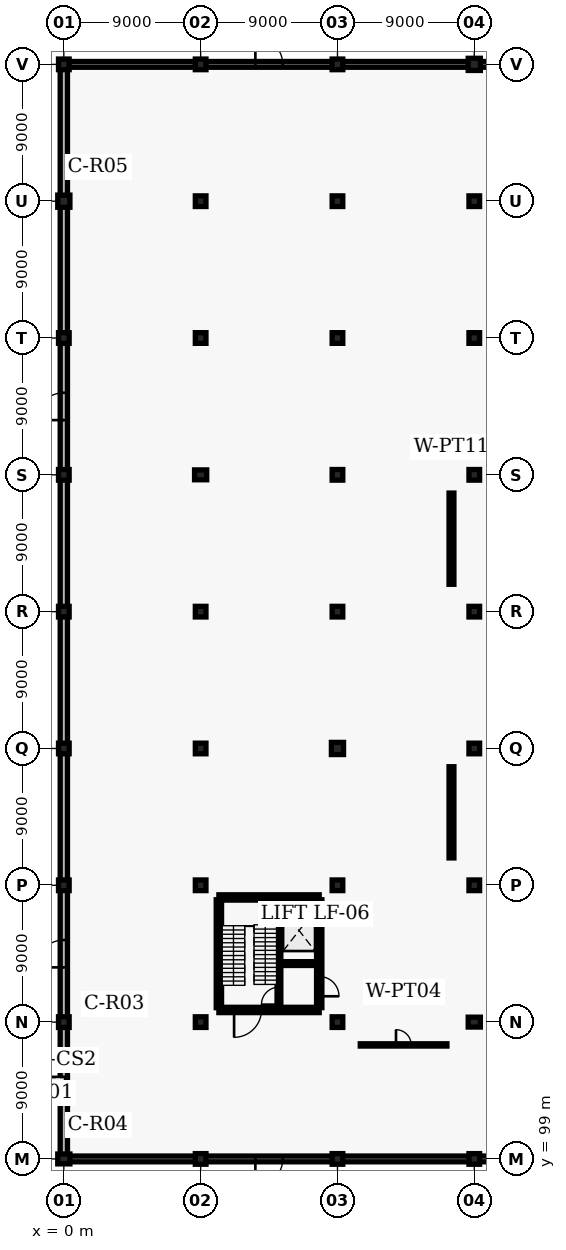
"""IFC4 building model, lengths in metres.
Left out: names, types, materials, properties, quantities, classifications, styles, units other than length and angle.
Written with IfcOpenShell. Run it as: python <this file> out.ifc"""

import sys

from ifc_helpers import new_model, si_unit, direction, frame, frame_2d, origin, origin_2d, place, context, subcontext, project, spatial, rectangle, circle, extrude, element, fill, save


model = new_model("IFC4")
c1 = context("Model", 3, precision=1e-05, world=origin(), true_north=direction((0.0, 1.0)))
c2 = subcontext(c1, "Body", "Model", "MODEL_VIEW")
j1 = project(units=[si_unit("LENGTHUNIT", "METRE"), si_unit("PLANEANGLEUNIT", "RADIAN")], contexts=[c1])
p1 = place(None, origin())
s1 = spatial("IfcSite", under=j1, at=p1, CompositionType="ELEMENT")
p2 = place(p1, origin())
s2 = spatial("IfcBuilding", under=s1, at=p2, CompositionType="ELEMENT")
p3 = place(p2, origin())
s3 = spatial("IfcBuildingStorey", under=s2, at=p3, CompositionType="ELEMENT", Elevation=0.0)
p4 = place(p3, frame((0.0, 99.0, 0.0), z_axis=(0.0, 0.0, 1.0), x_axis=(1.0, 0.0, 0.0)))
e1 = element("IfcColumn", 1, at=p4, inside=s3, PredefinedType="COLUMN", context=c2, shape_type="SweptSolid", body=[
    extrude(rectangle(XDim=0.8, YDim=0.65, at=origin_2d()), origin(), (0.0, 0.0, 1.0), 5.4),
])
for number, where, z_axis, x_axis in (
    (2, (0.0, 108.0, 0.0), (0.0, 0.0, 1.0), (1.0, 0.0, 0.0)),
    (3, (0.0, 117.0, 0.0), (0.0, 0.0, 1.0), (1.0, 0.0, 0.0)),
    (4, (0.0, 126.0, 0.0), (0.0, 0.0, 1.0), (1.0, 0.0, 0.0)),
    (5, (0.0, 135.0, 0.0), (0.0, 0.0, 1.0), (1.0, 0.0, 0.0)),
    (6, (0.0, 144.0, 0.0), (0.0, 0.0, 1.0), (1.0, 0.0, 0.0)),
    (7, (0.0, 153.0, 0.0), (0.0, 0.0, 1.0), (1.0, 0.0, 0.0)),
):
    element("IfcColumn", number, at=place(p3, frame(where, z_axis=z_axis, x_axis=x_axis)), inside=s3, PredefinedType="COLUMN", context=c2, shape_type="SweptSolid", body=[
        extrude(rectangle(XDim=0.7, YDim=0.7, at=origin_2d()), origin(), (0.0, 0.0, 1.0), 5.4),
    ])
p5 = place(p3, frame((0.0, 162.0, 0.0), z_axis=(0.0, 0.0, 1.0), x_axis=(1.0, 0.0, 0.0)))
e8 = element("IfcColumn", 8, at=p5, inside=s3, PredefinedType="COLUMN", context=c2, shape_type="SweptSolid", body=[
    extrude(circle(Radius=0.4, at=origin_2d()), origin(), (0.0, 0.0, 1.0), 5.4),
])
for number, where, z_axis, x_axis in (
    (9, (0.0, 171.0, 0.0), (0.0, 0.0, 1.0), (1.0, 0.0, 0.0)),
    (10, (9.0, 99.0, 0.0), (0.0, 0.0, 1.0), (1.0, 0.0, 0.0)),
    (11, (9.0, 108.0, 0.0), (0.0, 0.0, 1.0), (1.0, 0.0, 0.0)),
    (12, (9.0, 117.0, 0.0), (0.0, 0.0, 1.0), (1.0, 0.0, 0.0)),
    (13, (9.0, 126.0, 0.0), (0.0, 0.0, 1.0), (1.0, 0.0, 0.0)),
    (14, (9.0, 135.0, 0.0), (0.0, 0.0, 1.0), (1.0, 0.0, 0.0)),
):
    element("IfcColumn", number, at=place(p3, frame(where, z_axis=z_axis, x_axis=x_axis)), inside=s3, PredefinedType="COLUMN", context=c2, shape_type="SweptSolid", body=[
        extrude(rectangle(XDim=0.7, YDim=0.7, at=origin_2d()), origin(), (0.0, 0.0, 1.0), 5.4),
    ])
p6 = place(p3, frame((9.0, 144.0, 0.0), z_axis=(0.0, 0.0, 1.0), x_axis=(1.0, 0.0, 0.0)))
e15 = element("IfcColumn", 15, at=p6, inside=s3, PredefinedType="COLUMN", context=c2, shape_type="SweptSolid", body=[
    extrude(rectangle(XDim=0.8, YDim=0.65, at=origin_2d()), origin(), (0.0, 0.0, 1.0), 5.4),
])
for number, where, z_axis, x_axis in (
    (16, (9.0, 153.0, 0.0), (0.0, 0.0, 1.0), (1.0, 0.0, 0.0)),
    (17, (9.0, 162.0, 0.0), (0.0, 0.0, 1.0), (1.0, 0.0, 0.0)),
    (18, (9.0, 171.0, 0.0), (0.0, 0.0, 1.0), (1.0, 0.0, 0.0)),
    (19, (18.0, 99.0, 0.0), (0.0, 0.0, 1.0), (1.0, 0.0, 0.0)),
    (20, (18.0, 108.0, 0.0), (0.0, 0.0, 1.0), (1.0, 0.0, 0.0)),
    (21, (18.0, 117.0, 0.0), (0.0, 0.0, 1.0), (1.0, 0.0, 0.0)),
):
    element("IfcColumn", number, at=place(p3, frame(where, z_axis=z_axis, x_axis=x_axis)), inside=s3, PredefinedType="COLUMN", context=c2, shape_type="SweptSolid", body=[
        extrude(rectangle(XDim=0.7, YDim=0.7, at=origin_2d()), origin(), (0.0, 0.0, 1.0), 5.4),
    ])
p7 = place(p3, frame((18.0, 126.0, 0.0), z_axis=(0.0, 0.0, 1.0), x_axis=(1.0, 0.0, 0.0)))
e22 = element("IfcColumn", 22, at=p7, inside=s3, PredefinedType="COLUMN", context=c2, shape_type="SweptSolid", body=[
    extrude(circle(Radius=0.4, at=origin_2d()), origin(), (0.0, 0.0, 1.0), 5.4),
])
for number, where, z_axis, x_axis in (
    (23, (18.0, 135.0, 0.0), (0.0, 0.0, 1.0), (1.0, 0.0, 0.0)),
    (24, (18.0, 144.0, 0.0), (0.0, 0.0, 1.0), (1.0, 0.0, 0.0)),
    (25, (18.0, 153.0, 0.0), (0.0, 0.0, 1.0), (1.0, 0.0, 0.0)),
    (26, (18.0, 162.0, 0.0), (0.0, 0.0, 1.0), (1.0, 0.0, 0.0)),
    (27, (18.0, 171.0, 0.0), (0.0, 0.0, 1.0), (1.0, 0.0, 0.0)),
    (28, (27.0, 99.0, 0.0), (0.0, 0.0, 1.0), (1.0, 0.0, 0.0)),
):
    element("IfcColumn", number, at=place(p3, frame(where, z_axis=z_axis, x_axis=x_axis)), inside=s3, PredefinedType="COLUMN", context=c2, shape_type="SweptSolid", body=[
        extrude(rectangle(XDim=0.7, YDim=0.7, at=origin_2d()), origin(), (0.0, 0.0, 1.0), 5.4),
    ])
p8 = place(p3, frame((27.0, 108.0, 0.0), z_axis=(0.0, 0.0, 1.0), x_axis=(1.0, 0.0, 0.0)))
e29 = element("IfcColumn", 29, at=p8, inside=s3, PredefinedType="COLUMN", context=c2, shape_type="SweptSolid", body=[
    extrude(rectangle(XDim=0.8, YDim=0.65, at=origin_2d()), origin(), (0.0, 0.0, 1.0), 5.4),
])
for number, where, z_axis, x_axis in (
    (30, (27.0, 117.0, 0.0), (0.0, 0.0, 1.0), (1.0, 0.0, 0.0)),
    (31, (27.0, 126.0, 0.0), (0.0, 0.0, 1.0), (1.0, 0.0, 0.0)),
    (32, (27.0, 135.0, 0.0), (0.0, 0.0, 1.0), (1.0, 0.0, 0.0)),
    (33, (27.0, 144.0, 0.0), (0.0, 0.0, 1.0), (1.0, 0.0, 0.0)),
    (34, (27.0, 153.0, 0.0), (0.0, 0.0, 1.0), (1.0, 0.0, 0.0)),
    (35, (27.0, 162.0, 0.0), (0.0, 0.0, 1.0), (1.0, 0.0, 0.0)),
):
    element("IfcColumn", number, at=place(p3, frame(where, z_axis=z_axis, x_axis=x_axis)), inside=s3, PredefinedType="COLUMN", context=c2, shape_type="SweptSolid", body=[
        extrude(rectangle(XDim=0.7, YDim=0.7, at=origin_2d()), origin(), (0.0, 0.0, 1.0), 5.4),
    ])
p9 = place(p3, frame((27.0, 171.0, 0.0), z_axis=(0.0, 0.0, 1.0), x_axis=(1.0, 0.0, 0.0)))
e36 = element("IfcColumn", 36, at=p9, inside=s3, PredefinedType="COLUMN", context=c2, shape_type="SweptSolid", body=[
    extrude(circle(Radius=0.4, at=origin_2d()), origin(), (0.0, 0.0, 1.0), 5.4),
])
p10 = place(p3, frame((0.06, 171.0, 0.0), z_axis=(0.0, 0.0, 1.0), x_axis=(1.0, 0.0, 0.0)))
e37 = element("IfcWall", 37, at=p10, inside=s3, PredefinedType="SOLIDWALL", context=c2, shape_type="SweptSolid", body=[
    extrude(rectangle(XDim=8.88, YDim=0.38, at=frame_2d((4.44, 0.0))), origin(), (0.0, 0.0, 1.0), 4.55),
])
p11 = place(p3, frame((9.06, 171.0, 0.0), z_axis=(0.0, 0.0, 1.0), x_axis=(1.0, 0.0, 0.0)))
e38 = element("IfcWall", 38, at=p11, inside=s3, PredefinedType="SOLIDWALL", context=c2, shape_type="SweptSolid", body=[
    extrude(rectangle(XDim=8.88, YDim=0.38, at=frame_2d((4.44, 0.0))), origin(), (0.0, 0.0, 1.0), 4.55),
])
p12 = place(p11, frame((3.54, 0.0, 0.0)))
e39 = element("IfcOpeningElement", 39, at=p12, cuts=e38, PredefinedType="OPENING", context=c2, shape_type="SweptSolid", body=[
    extrude(rectangle(XDim=1.8, YDim=2.15, at=frame_2d((0.9, 1.075))), frame((0.0, 0.2, 0.0), z_axis=(0.0, -1.0, 0.0), x_axis=(1.0, 0.0, 0.0)), (0.0, 0.0, 1.0), 0.4),
])
for number, where, z_axis, x_axis in (
    (40, (18.06, 171.0, 0.0), (0.0, 0.0, 1.0), (1.0, 0.0, 0.0)),
    (41, (27.06, 171.0, 0.0), (0.0, 0.0, 1.0), (1.0, 0.0, 0.0)),
):
    element("IfcWall", number, at=place(p3, frame(where, z_axis=z_axis, x_axis=x_axis)), inside=s3, PredefinedType="SOLIDWALL", context=c2, shape_type="SweptSolid", body=[
        extrude(rectangle(XDim=8.88, YDim=0.38, at=frame_2d((4.44, 0.0))), origin(), (0.0, 0.0, 1.0), 4.55),
    ])
p13 = place(p3, frame((0.0, 99.06, 0.0), z_axis=(0.0, 0.0, 1.0), x_axis=(0.0, 1.0, 0.0)))
e42 = element("IfcWall", 42, at=p13, inside=s3, PredefinedType="SOLIDWALL", context=c2, shape_type="SweptSolid", body=[
    extrude(rectangle(XDim=8.88, YDim=0.48, at=frame_2d((4.44, 0.0))), origin(), (0.0, 0.0, 1.0), 4.55),
])
p14 = place(p3, frame((0.0, 108.06, 0.0), z_axis=(0.0, 0.0, 1.0), x_axis=(0.0, 1.0, 0.0)))
e43 = element("IfcWall", 43, at=p14, inside=s3, PredefinedType="SOLIDWALL", context=c2, shape_type="SweptSolid", body=[
    extrude(rectangle(XDim=8.88, YDim=0.48, at=frame_2d((4.44, 0.0))), origin(), (0.0, 0.0, 1.0), 4.55),
])
p15 = place(p14, frame((3.54, 0.0, 0.0)))
e44 = element("IfcOpeningElement", 44, at=p15, cuts=e43, PredefinedType="OPENING", context=c2, shape_type="SweptSolid", body=[
    extrude(rectangle(XDim=1.8, YDim=2.15, at=frame_2d((0.9, 1.075))), frame((0.0, 0.25, 0.0), z_axis=(0.0, -1.0, 0.0), x_axis=(1.0, 0.0, 0.0)), (0.0, 0.0, 1.0), 0.5),
])
for number, where, z_axis, x_axis in (
    (45, (0.0, 117.06, 0.0), (0.0, 0.0, 1.0), (0.0, 1.0, 0.0)),
    (46, (0.0, 126.06, 0.0), (0.0, 0.0, 1.0), (0.0, 1.0, 0.0)),
    (47, (0.0, 135.06, 0.0), (0.0, 0.0, 1.0), (0.0, 1.0, 0.0)),
):
    element("IfcWall", number, at=place(p3, frame(where, z_axis=z_axis, x_axis=x_axis)), inside=s3, PredefinedType="SOLIDWALL", context=c2, shape_type="SweptSolid", body=[
        extrude(rectangle(XDim=8.88, YDim=0.48, at=frame_2d((4.44, 0.0))), origin(), (0.0, 0.0, 1.0), 4.55),
    ])
p16 = place(p3, frame((0.0, 144.06, 0.0), z_axis=(0.0, 0.0, 1.0), x_axis=(0.0, 1.0, 0.0)))
e48 = element("IfcWall", 48, at=p16, inside=s3, PredefinedType="SOLIDWALL", context=c2, shape_type="SweptSolid", body=[
    extrude(rectangle(XDim=8.88, YDim=0.48, at=frame_2d((4.44, 0.0))), origin(), (0.0, 0.0, 1.0), 4.55),
])
p17 = place(p16, frame((3.54, 0.0, 0.0)))
e49 = element("IfcOpeningElement", 49, at=p17, cuts=e48, PredefinedType="OPENING", context=c2, shape_type="SweptSolid", body=[
    extrude(rectangle(XDim=1.8, YDim=2.15, at=frame_2d((0.9, 1.075))), frame((0.0, 0.25, 0.0), z_axis=(0.0, -1.0, 0.0), x_axis=(1.0, 0.0, 0.0)), (0.0, 0.0, 1.0), 0.5),
])
for number, where, z_axis, x_axis in (
    (50, (0.0, 153.06, 0.0), (0.0, 0.0, 1.0), (0.0, 1.0, 0.0)),
    (51, (0.0, 162.06, 0.0), (0.0, 0.0, 1.0), (0.0, 1.0, 0.0)),
):
    element("IfcWall", number, at=place(p3, frame(where, z_axis=z_axis, x_axis=x_axis)), inside=s3, PredefinedType="SOLIDWALL", context=c2, shape_type="SweptSolid", body=[
        extrude(rectangle(XDim=8.88, YDim=0.48, at=frame_2d((4.44, 0.0))), origin(), (0.0, 0.0, 1.0), 4.55),
    ])
p18 = place(p3, frame((0.06, 99.0, 0.0), z_axis=(0.0, 0.0, 1.0), x_axis=(1.0, 0.0, 0.0)))
e52 = element("IfcWall", 52, at=p18, inside=s3, PredefinedType="SOLIDWALL", context=c2, shape_type="SweptSolid", body=[
    extrude(rectangle(XDim=8.88, YDim=0.38, at=frame_2d((4.44, 0.0))), origin(), (0.0, 0.0, 1.0), 4.55),
])
p19 = place(p3, frame((9.06, 99.0, 0.0), z_axis=(0.0, 0.0, 1.0), x_axis=(1.0, 0.0, 0.0)))
e53 = element("IfcWall", 53, at=p19, inside=s3, PredefinedType="SOLIDWALL", context=c2, shape_type="SweptSolid", body=[
    extrude(rectangle(XDim=8.88, YDim=0.38, at=frame_2d((4.44, 0.0))), origin(), (0.0, 0.0, 1.0), 4.55),
])
p20 = place(p19, frame((3.54, 0.0, 0.0)))
e54 = element("IfcOpeningElement", 54, at=p20, cuts=e53, PredefinedType="OPENING", context=c2, shape_type="SweptSolid", body=[
    extrude(rectangle(XDim=1.8, YDim=2.15, at=frame_2d((0.9, 1.075))), frame((0.0, 0.2, 0.0), z_axis=(0.0, -1.0, 0.0), x_axis=(1.0, 0.0, 0.0)), (0.0, 0.0, 1.0), 0.4),
])
for number, where, z_axis, x_axis in (
    (55, (18.06, 99.0, 0.0), (0.0, 0.0, 1.0), (1.0, 0.0, 0.0)),
    (56, (27.06, 99.0, 0.0), (0.0, 0.0, 1.0), (1.0, 0.0, 0.0)),
):
    element("IfcWall", number, at=place(p3, frame(where, z_axis=z_axis, x_axis=x_axis)), inside=s3, PredefinedType="SOLIDWALL", context=c2, shape_type="SweptSolid", body=[
        extrude(rectangle(XDim=8.88, YDim=0.38, at=frame_2d((4.44, 0.0))), origin(), (0.0, 0.0, 1.0), 4.55),
    ])
p21 = place(p3, frame((10.2, 108.8, 0.0), z_axis=(0.0, 0.0, 1.0), x_axis=(1.0, 0.0, 0.0)))
e57 = element("IfcWall", 57, at=p21, inside=s3, PredefinedType="SHEAR", context=c2, shape_type="SweptSolid", body=[
    extrude(rectangle(XDim=6.6, YDim=0.35, at=frame_2d((3.3, 0.0))), origin(), (0.0, 0.0, 1.0), 5.4),
])
p22 = place(p21, frame((1.0, 0.0, 0.0)))
e58 = element("IfcOpeningElement", 58, at=p22, cuts=e57, PredefinedType="OPENING", context=c2, shape_type="SweptSolid", body=[
    extrude(rectangle(XDim=1.8, YDim=2.15, at=frame_2d((0.9, 1.075))), frame((0.0, 0.185, 0.0), z_axis=(0.0, -1.0, 0.0), x_axis=(1.0, 0.0, 0.0)), (0.0, 0.0, 1.0), 0.37),
])
p23 = place(p3, frame((10.2, 116.2, 0.0), z_axis=(0.0, 0.0, 1.0), x_axis=(1.0, 0.0, 0.0)))
e59 = element("IfcWall", 59, at=p23, inside=s3, PredefinedType="SHEAR", context=c2, shape_type="SweptSolid", body=[
    extrude(rectangle(XDim=6.6, YDim=0.35, at=frame_2d((3.3, 0.0))), origin(), (0.0, 0.0, 1.0), 5.4),
])
p24 = place(p3, frame((10.2, 108.95, 0.0), z_axis=(0.0, 0.0, 1.0), x_axis=(0.0, 1.0, 0.0)))
e60 = element("IfcWall", 60, at=p24, inside=s3, PredefinedType="SHEAR", context=c2, shape_type="SweptSolid", body=[
    extrude(rectangle(XDim=7.1, YDim=0.35, at=frame_2d((3.55, 0.0))), origin(), (0.0, 0.0, 1.0), 5.4),
])
p25 = place(p3, frame((16.8, 108.95, 0.0), z_axis=(0.0, 0.0, 1.0), x_axis=(0.0, 1.0, 0.0)))
e61 = element("IfcWall", 61, at=p25, inside=s3, PredefinedType="SHEAR", context=c2, shape_type="SweptSolid", body=[
    extrude(rectangle(XDim=7.1, YDim=0.35, at=frame_2d((3.55, 0.0))), origin(), (0.0, 0.0, 1.0), 5.4),
])
p26 = place(p25, frame((0.75, 0.0, 0.0)))
e62 = element("IfcOpeningElement", 62, at=p26, cuts=e61, PredefinedType="OPENING", context=c2, shape_type="SweptSolid", body=[
    extrude(rectangle(XDim=1.3, YDim=2.15, at=frame_2d((0.65, 1.075))), frame((0.0, 0.185, 0.0), z_axis=(0.0, -1.0, 0.0), x_axis=(1.0, 0.0, 0.0)), (0.0, 0.0, 1.0), 0.37),
])
p27 = place(p3, frame((14.15, 108.95, 0.0), z_axis=(0.0, 0.0, 1.0), x_axis=(0.0, 1.0, 0.0)))
e63 = element("IfcWall", 63, at=p27, inside=s3, PredefinedType="SHEAR", context=c2, shape_type="SweptSolid", body=[
    extrude(rectangle(XDim=7.1, YDim=0.25, at=frame_2d((3.55, 0.0))), origin(), (0.0, 0.0, 1.0), 5.4),
])
p28 = place(p27, frame((0.2, 0.0, 0.0)))
e64 = element("IfcOpeningElement", 64, at=p28, cuts=e63, PredefinedType="OPENING", context=c2, shape_type="SweptSolid", body=[
    extrude(rectangle(XDim=1.15, YDim=2.15, at=frame_2d((0.575, 1.075))), frame((0.0, 0.135, 0.0), z_axis=(0.0, -1.0, 0.0), x_axis=(1.0, 0.0, 0.0)), (0.0, 0.0, 1.0), 0.27),
])
p29 = place(p3, frame((14.27, 111.85, 0.0), z_axis=(0.0, 0.0, 1.0), x_axis=(1.0, 0.0, 0.0)))
e65 = element("IfcWall", 65, at=p29, inside=s3, PredefinedType="SHEAR", context=c2, shape_type="SweptSolid", body=[
    extrude(rectangle(XDim=2.38, YDim=0.25, at=frame_2d((1.19, 0.0))), origin(), (0.0, 0.0, 1.0), 5.4),
])
p30 = place(p29, frame((0.39, 0.0, 0.0)))
e66 = element("IfcOpeningElement", 66, at=p30, cuts=e65, PredefinedType="OPENING", context=c2, shape_type="SweptSolid", body=[
    extrude(rectangle(XDim=1.6, YDim=2.3, at=frame_2d((0.8, 1.15))), frame((0.0, 0.135, 0.0), z_axis=(0.0, -1.0, 0.0), x_axis=(1.0, 0.0, 0.0)), (0.0, 0.0, 1.0), 0.27),
])
p31 = place(p3, frame((25.5, 136.8, 0.0), z_axis=(0.0, 0.0, 1.0), x_axis=(0.0, 1.0, 0.0)))
e67 = element("IfcWall", 67, at=p31, inside=s3, PredefinedType="PARTITIONING", context=c2, shape_type="SweptSolid", body=[
    extrude(rectangle(XDim=6.0, YDim=0.32, at=frame_2d((3.0, 0.0))), origin(), (0.0, 0.0, 1.0), 4.3),
])
p32 = place(p31, frame((1.95, 0.0, 0.0)))
e68 = element("IfcOpeningElement", 68, at=p32, cuts=e67, PredefinedType="OPENING", context=c2, shape_type="SweptSolid", body=[
    extrude(rectangle(XDim=2.1, YDim=2.6, at=frame_2d((1.05, 1.3))), frame((0.0, 0.17, 0.0), z_axis=(0.0, -1.0, 0.0), x_axis=(1.0, 0.0, 0.0)), (0.0, 0.0, 1.0), 0.34),
])
p33 = place(p3, frame((25.5, 118.8, 0.0), z_axis=(0.0, 0.0, 1.0), x_axis=(0.0, 1.0, 0.0)))
e69 = element("IfcWall", 69, at=p33, inside=s3, PredefinedType="PARTITIONING", context=c2, shape_type="SweptSolid", body=[
    extrude(rectangle(XDim=6.0, YDim=0.32, at=frame_2d((3.0, 0.0))), origin(), (0.0, 0.0, 1.0), 4.3),
])
p34 = place(p33, frame((1.95, 0.0, 0.0)))
e70 = element("IfcOpeningElement", 70, at=p34, cuts=e69, PredefinedType="OPENING", context=c2, shape_type="SweptSolid", body=[
    extrude(rectangle(XDim=2.1, YDim=2.6, at=frame_2d((1.05, 1.3))), frame((0.0, 0.17, 0.0), z_axis=(0.0, -1.0, 0.0), x_axis=(1.0, 0.0, 0.0)), (0.0, 0.0, 1.0), 0.34),
])
p35 = place(p3, frame((19.5, 106.5, 0.0), z_axis=(0.0, 0.0, 1.0), x_axis=(1.0, 0.0, 0.0)))
e71 = element("IfcWall", 71, at=p35, inside=s3, PredefinedType="PARTITIONING", context=c2, shape_type="SweptSolid", body=[
    extrude(rectangle(XDim=5.7, YDim=0.15, at=frame_2d((2.85, 0.0))), origin(), (0.0, 0.0, 1.0), 4.3),
])
p36 = place(p35, frame((2.35, 0.0, 0.0)))
e72 = element("IfcOpeningElement", 72, at=p36, cuts=e71, PredefinedType="OPENING", context=c2, shape_type="SweptSolid", body=[
    extrude(rectangle(XDim=1.0, YDim=2.1, at=frame_2d((0.5, 1.05))), frame((0.0, 0.085, 0.0), z_axis=(0.0, -1.0, 0.0), x_axis=(1.0, 0.0, 0.0)), (0.0, 0.0, 1.0), 0.17),
])
p37 = place(p12, origin())
e73 = element("IfcDoor", 73, at=p37, inside=s3, OperationType="DOUBLE_DOOR_SINGLE_SWING", PredefinedType="DOOR", context=c2, shape_type="SweptSolid", body=[
    extrude(rectangle(XDim=1.8, YDim=2.15, at=frame_2d((0.9, 1.075))), frame((0.0, 0.025, 0.0), z_axis=(0.0, -1.0, 0.0), x_axis=(1.0, 0.0, 0.0)), (0.0, 0.0, 1.0), 0.05),
])
fill(e39, e73)
p38 = place(p15, origin())
e74 = element("IfcDoor", 74, at=p38, inside=s3, OperationType="DOUBLE_DOOR_SINGLE_SWING", PredefinedType="DOOR", context=c2, shape_type="SweptSolid", body=[
    extrude(rectangle(XDim=1.8, YDim=2.15, at=frame_2d((0.9, 1.075))), frame((0.0, 0.025, 0.0), z_axis=(0.0, -1.0, 0.0), x_axis=(1.0, 0.0, 0.0)), (0.0, 0.0, 1.0), 0.05),
])
fill(e44, e74)
p39 = place(p17, origin())
e75 = element("IfcDoor", 75, at=p39, inside=s3, OperationType="DOUBLE_DOOR_SINGLE_SWING", PredefinedType="DOOR", context=c2, shape_type="SweptSolid", body=[
    extrude(rectangle(XDim=1.8, YDim=2.15, at=frame_2d((0.9, 1.075))), frame((0.0, 0.025, 0.0), z_axis=(0.0, -1.0, 0.0), x_axis=(1.0, 0.0, 0.0)), (0.0, 0.0, 1.0), 0.05),
])
fill(e49, e75)
p40 = place(p20, frame((1.8, 0.0, 0.0), z_axis=(0.0, 0.0, 1.0), x_axis=(-1.0, 0.0, 0.0)))
e76 = element("IfcDoor", 76, at=p40, inside=s3, OperationType="DOUBLE_DOOR_SINGLE_SWING", PredefinedType="DOOR", context=c2, shape_type="SweptSolid", body=[
    extrude(rectangle(XDim=1.8, YDim=2.15, at=frame_2d((0.9, 1.075))), frame((0.0, 0.025, 0.0), z_axis=(0.0, -1.0, 0.0), x_axis=(1.0, 0.0, 0.0)), (0.0, 0.0, 1.0), 0.05),
])
fill(e54, e76)
p41 = place(p26, frame((1.3, 0.0, 0.0), z_axis=(0.0, 0.0, 1.0), x_axis=(-1.0, 0.0, 0.0)))
e77 = element("IfcDoor", 77, at=p41, inside=s3, OperationType="DOUBLE_DOOR_SINGLE_SWING", PredefinedType="DOOR", context=c2, shape_type="SweptSolid", body=[
    extrude(rectangle(XDim=1.3, YDim=2.15, at=frame_2d((0.65, 1.075))), frame((0.0, 0.025, 0.0), z_axis=(0.0, -1.0, 0.0), x_axis=(1.0, 0.0, 0.0)), (0.0, 0.0, 1.0), 0.05),
])
fill(e62, e77)
p42 = place(p28, origin())
e78 = element("IfcDoor", 78, at=p42, inside=s3, OperationType="SINGLE_SWING_LEFT", PredefinedType="DOOR", context=c2, shape_type="SweptSolid", body=[
    extrude(rectangle(XDim=1.15, YDim=2.15, at=frame_2d((0.575, 1.075))), frame((0.0, 0.025, 0.0), z_axis=(0.0, -1.0, 0.0), x_axis=(1.0, 0.0, 0.0)), (0.0, 0.0, 1.0), 0.05),
])
fill(e64, e78)
p43 = place(p22, frame((1.8, 0.0, 0.0), z_axis=(0.0, 0.0, 1.0), x_axis=(-1.0, 0.0, 0.0)))
e79 = element("IfcDoor", 79, at=p43, inside=s3, OperationType="DOUBLE_DOOR_SINGLE_SWING", PredefinedType="DOOR", context=c2, shape_type="SweptSolid", body=[
    extrude(rectangle(XDim=1.8, YDim=2.15, at=frame_2d((0.9, 1.075))), frame((0.0, 0.025, 0.0), z_axis=(0.0, -1.0, 0.0), x_axis=(1.0, 0.0, 0.0)), (0.0, 0.0, 1.0), 0.05),
])
fill(e58, e79)
p44 = place(p30, origin())
e80 = element("IfcDoor", 80, at=p44, inside=s3, OperationType="SLIDING_TO_LEFT", PredefinedType="DOOR", context=c2, shape_type="SweptSolid", body=[
    extrude(rectangle(XDim=1.6, YDim=2.3, at=frame_2d((0.8, 1.15))), frame((0.0, 0.025, 0.0), z_axis=(0.0, -1.0, 0.0), x_axis=(1.0, 0.0, 0.0)), (0.0, 0.0, 1.0), 0.05),
])
fill(e66, e80)
p45 = place(p32, origin())
e81 = element("IfcDoor", 81, at=p45, inside=s3, OperationType="SLIDING_TO_LEFT", PredefinedType="DOOR", context=c2, shape_type="SweptSolid", body=[
    extrude(rectangle(XDim=2.1, YDim=2.6, at=frame_2d((1.05, 1.3))), frame((0.0, 0.025, 0.0), z_axis=(0.0, -1.0, 0.0), x_axis=(1.0, 0.0, 0.0)), (0.0, 0.0, 1.0), 0.05),
])
fill(e68, e81)
p46 = place(p34, origin())
e82 = element("IfcDoor", 82, at=p46, inside=s3, OperationType="SLIDING_TO_RIGHT", PredefinedType="DOOR", context=c2, shape_type="SweptSolid", body=[
    extrude(rectangle(XDim=2.1, YDim=2.6, at=frame_2d((1.05, 1.3))), frame((0.0, 0.025, 0.0), z_axis=(0.0, -1.0, 0.0), x_axis=(1.0, 0.0, 0.0)), (0.0, 0.0, 1.0), 0.05),
])
fill(e70, e82)
p47 = place(p36, origin())
e83 = element("IfcDoor", 83, at=p47, inside=s3, OperationType="SINGLE_SWING_LEFT", PredefinedType="DOOR", context=c2, shape_type="SweptSolid", body=[
    extrude(rectangle(XDim=1.0, YDim=2.1, at=frame_2d((0.5, 1.05))), frame((0.0, 0.025, 0.0), z_axis=(0.0, -1.0, 0.0), x_axis=(1.0, 0.0, 0.0)), (0.0, 0.0, 1.0), 0.05),
])
fill(e72, e83)
save(model, sys.argv[1])
